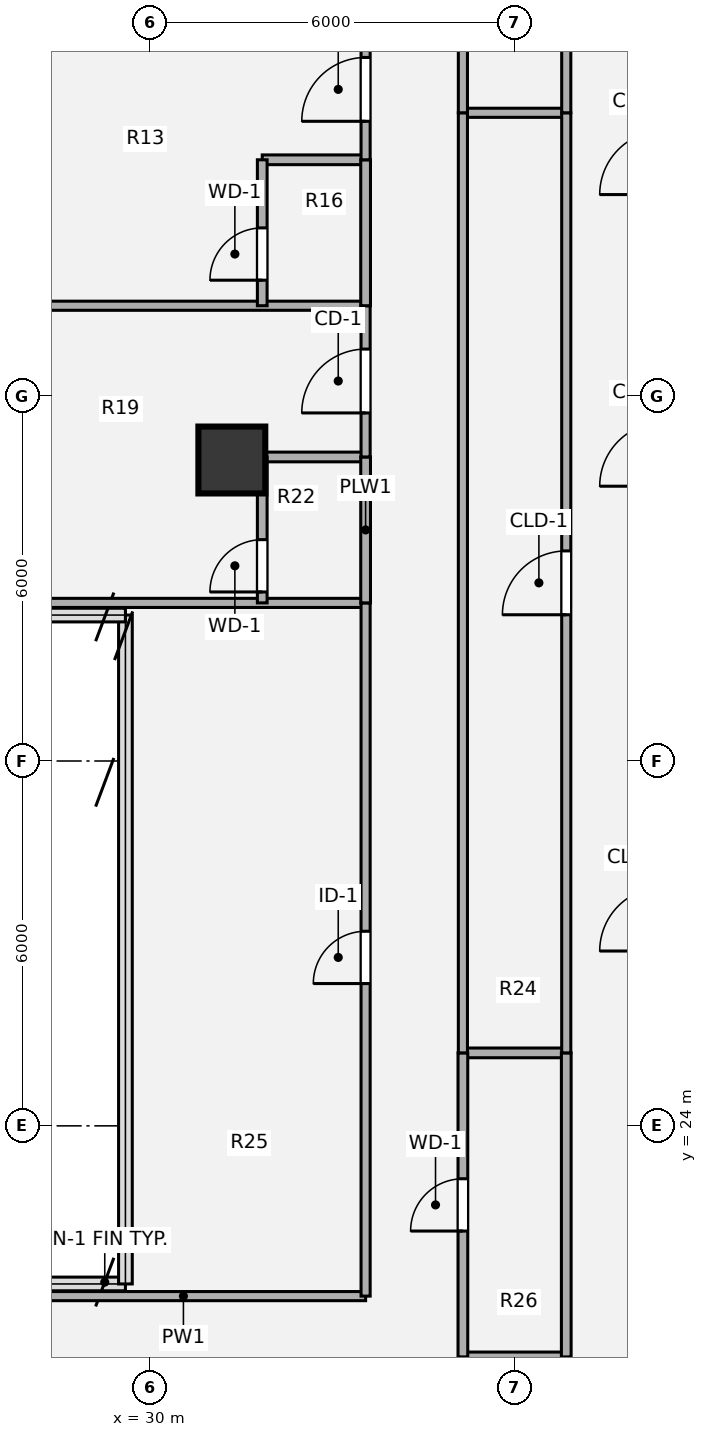
"""IFC4 building model, lengths in metres.
Left out: names, types, materials, properties, quantities, classifications, styles, units other than length and angle.
Written with IfcOpenShell. Run it as: python <this file> out.ifc"""

import sys

from ifc_helpers import new_model, si_unit, direction, frame, frame_2d, origin, origin_2d, place, context, subcontext, project, spatial, rectangle, hollow_circle, extrude, source, transform, mapped, element, fill, save


model = new_model("IFC4")
c1 = context("Model", 3, precision=1e-05, world=origin(), true_north=direction((0.0, 1.0)))
c2 = subcontext(c1, "Body", "Model", "MODEL_VIEW")
j1 = project(units=[si_unit("LENGTHUNIT", "METRE"), si_unit("PLANEANGLEUNIT", "RADIAN")], contexts=[c1])
p1 = place(None, origin())
s1 = spatial("IfcSite", under=j1, at=p1, CompositionType="ELEMENT")
p2 = place(p1, origin())
s2 = spatial("IfcBuilding", under=s1, at=p2, CompositionType="ELEMENT")
p3 = place(p2, frame((0.0, 0.0, 194.22)))
s3 = spatial("IfcBuildingStorey", under=s2, at=p3, CompositionType="ELEMENT", Elevation=194.22)
m1 = source(origin(), c2, "Body", "SweptSolid", [
    extrude(hollow_circle(Radius=0.55, WallThickness=0.04, at=origin_2d()), origin(), (0.0, 0.0, 1.0), 3.78),
])
p4 = place(p3, frame((31.35, 34.95, 0.0), z_axis=(0.0, 0.0, 1.0), x_axis=(1.0, 0.0, 0.0)))
e1 = element("IfcColumn", 1, at=p4, inside=s3, PredefinedType="COLUMN", context=c2, shape_type="MappedRepresentation", body=[
    mapped(m1, transform((0.0, 0.0, 0.0), x_axis=(1.0, 0.0, 0.0), y_axis=(0.0, 1.0, 0.0), z_axis=(0.0, 0.0, 1.0), scale=1.0)),
])
p5 = place(p3, frame((35.15, 20.2, 0.0), z_axis=(0.0, 0.0, 1.0), x_axis=(1.0, 0.0, 0.0)))
e2 = element("IfcWall", 2, at=p5, inside=s3, PredefinedType="PLUMBINGWALL", context=c2, shape_type="SweptSolid", body=[
    extrude(rectangle(XDim=1.7, YDim=0.16, at=frame_2d((0.85, 0.0))), origin(), (0.0, 0.0, 1.0), 3.5),
])
p6 = place(p3, frame((27.558, 21.2, 0.0), z_axis=(0.0, 0.0, 1.0), x_axis=(1.0, 0.0, 0.0)))
e3 = element("IfcWall", 3, at=p6, inside=s3, PredefinedType="PARTITIONING", context=c2, shape_type="SweptSolid", body=[
    extrude(rectangle(XDim=5.992, YDim=0.15, at=frame_2d((2.996, 0.0))), origin(), (0.0, 0.0, 1.0), 3.5),
])
p7 = place(p3, frame((35.15, 25.2, 0.0), z_axis=(0.0, 0.0, 1.0), x_axis=(1.0, 0.0, 0.0)))
e4 = element("IfcWall", 4, at=p7, inside=s3, PredefinedType="PLUMBINGWALL", context=c2, shape_type="SweptSolid", body=[
    extrude(rectangle(XDim=1.7, YDim=0.16, at=frame_2d((0.85, 0.0))), origin(), (0.0, 0.0, 1.0), 3.5),
])
p8 = place(p3, frame((27.557, 32.6, 0.0), z_axis=(0.0, 0.0, 1.0), x_axis=(1.0, 0.0, 0.0)))
e5 = element("IfcWall", 5, at=p8, inside=s3, PredefinedType="PARTITIONING", context=c2, shape_type="SweptSolid", body=[
    extrude(rectangle(XDim=5.993, YDim=0.15, at=frame_2d((2.997, 0.0))), origin(), (0.0, 0.0, 1.0), 3.5),
])
p9 = place(p3, frame((31.85, 35.0, 0.0), z_axis=(0.0, 0.0, 1.0), x_axis=(1.0, 0.0, 0.0)))
e6 = element("IfcWall", 6, at=p9, inside=s3, PredefinedType="PLUMBINGWALL", context=c2, shape_type="SweptSolid", body=[
    extrude(rectangle(XDim=1.7, YDim=0.16, at=frame_2d((0.85, 0.0))), origin(), (0.0, 0.0, 1.0), 2.903),
])
p10 = place(p3, frame((27.35, 37.487, 0.0), z_axis=(0.0, 0.0, 1.0), x_axis=(1.0, 0.0, 0.0)))
e7 = element("IfcWall", 7, at=p10, inside=s3, PredefinedType="PARTITIONING", context=c2, shape_type="SweptSolid", body=[
    extrude(rectangle(XDim=6.2, YDim=0.15, at=frame_2d((3.1, 0.0))), origin(), (0.0, 0.0, 1.0), 3.055),
])
p11 = place(p3, frame((31.85, 39.887, 0.0), z_axis=(0.0, 0.0, 1.0), x_axis=(1.0, 0.0, 0.0)))
e8 = element("IfcWall", 8, at=p11, inside=s3, PredefinedType="PLUMBINGWALL", context=c2, shape_type="SweptSolid", body=[
    extrude(rectangle(XDim=1.7, YDim=0.16, at=frame_2d((0.85, 0.0))), origin(), (0.0, 0.0, 1.0), 3.259),
])
p12 = place(p3, frame((35.15, 40.66, 0.0), z_axis=(0.0, 0.0, 1.0), x_axis=(1.0, 0.0, 0.0)))
e9 = element("IfcWall", 9, at=p12, inside=s3, PredefinedType="PARTITIONING", context=c2, shape_type="SweptSolid", body=[
    extrude(rectangle(XDim=1.7, YDim=0.15, at=frame_2d((0.85, 0.0))), origin(), (0.0, 0.0, 1.0), 3.259),
])
p13 = place(p3, frame((31.85, 32.6, 0.0), z_axis=(0.0, 0.0, 1.0), x_axis=(0.0, 1.0, 0.0)))
e10 = element("IfcWall", 10, at=p13, inside=s3, PredefinedType="PLUMBINGWALL", context=c2, shape_type="SweptSolid", body=[
    extrude(rectangle(XDim=2.4, YDim=0.16, at=frame_2d((1.2, 0.0))), origin(), (0.0, 0.0, 1.0), 3.5),
])
p14 = place(p13, frame((0.18, 0.0, 0.0)))
e11 = element("IfcOpeningElement", 11, at=p14, cuts=e10, PredefinedType="OPENING", context=c2, shape_type="SweptSolid", body=[
    extrude(rectangle(XDim=0.86, YDim=2.1, at=origin_2d()), frame((0.43, 0.09, 1.05), z_axis=(0.0, -1.0, 0.0), x_axis=(1.0, 0.0, 0.0)), (0.0, 0.0, 1.0), 0.18),
])
p15 = place(p3, frame((31.85, 37.487, 0.0), z_axis=(0.0, 0.0, 1.0), x_axis=(0.0, 1.0, 0.0)))
e12 = element("IfcWall", 12, at=p15, inside=s3, PredefinedType="PLUMBINGWALL", context=c2, shape_type="SweptSolid", body=[
    extrude(rectangle(XDim=2.4, YDim=0.16, at=frame_2d((1.2, 0.0))), origin(), (0.0, 0.0, 1.0), 3.5),
])
p16 = place(p15, frame((0.42, 0.0, 0.0)))
e13 = element("IfcOpeningElement", 13, at=p16, cuts=e12, PredefinedType="OPENING", context=c2, shape_type="SweptSolid", body=[
    extrude(rectangle(XDim=0.86, YDim=2.1, at=origin_2d()), frame((0.43, 0.09, 1.05), z_axis=(0.0, -1.0, 0.0), x_axis=(1.0, 0.0, 0.0)), (0.0, 0.0, 1.0), 0.18),
])
p17 = place(p3, frame((33.55, 21.2, 0.0), z_axis=(0.0, 0.0, 1.0), x_axis=(0.0, 1.0, 0.0)))
e14 = element("IfcWall", 14, at=p17, inside=s3, PredefinedType="PARTITIONING", context=c2, shape_type="SweptSolid", body=[
    extrude(rectangle(XDim=11.4, YDim=0.15, at=frame_2d((5.7, 0.0))), origin(), (0.0, 0.0, 1.0), 3.5),
])
p18 = place(p17, frame((5.14, 0.0, 0.0)))
e15 = element("IfcOpeningElement", 15, at=p18, cuts=e14, PredefinedType="OPENING", context=c2, shape_type="SweptSolid", body=[
    extrude(rectangle(XDim=0.86, YDim=2.1, at=origin_2d()), frame((0.43, 0.085, 1.05), z_axis=(0.0, -1.0, 0.0), x_axis=(1.0, 0.0, 0.0)), (0.0, 0.0, 1.0), 0.17),
])
p19 = place(p3, frame((33.55, 32.6, 0.0), z_axis=(0.0, 0.0, 1.0), x_axis=(0.0, 1.0, 0.0)))
e16 = element("IfcWall", 16, at=p19, inside=s3, PredefinedType="PLUMBINGWALL", context=c2, shape_type="SweptSolid", body=[
    extrude(rectangle(XDim=2.4, YDim=0.16, at=frame_2d((1.2, 0.0))), origin(), (0.0, 0.0, 1.0), 3.5),
])
p20 = place(p3, frame((33.55, 35.0, 0.0), z_axis=(0.0, 0.0, 1.0), x_axis=(0.0, 1.0, 0.0)))
e17 = element("IfcWall", 17, at=p20, inside=s3, PredefinedType="PARTITIONING", context=c2, shape_type="SweptSolid", body=[
    extrude(rectangle(XDim=2.487, YDim=0.15, at=frame_2d((1.244, 0.0))), origin(), (0.0, 0.0, 1.0), 3.5),
])
p21 = place(p20, frame((0.724, 0.0, 0.0)))
e18 = element("IfcOpeningElement", 18, at=p21, cuts=e17, PredefinedType="OPENING", context=c2, shape_type="SweptSolid", body=[
    extrude(rectangle(XDim=1.05, YDim=2.1, at=origin_2d()), frame((0.525, 0.085, 1.05), z_axis=(0.0, -1.0, 0.0), x_axis=(1.0, 0.0, 0.0)), (0.0, 0.0, 1.0), 0.17),
])
p22 = place(p3, frame((33.55, 37.487, 0.0), z_axis=(0.0, 0.0, 1.0), x_axis=(0.0, 1.0, 0.0)))
e19 = element("IfcWall", 19, at=p22, inside=s3, PredefinedType="PLUMBINGWALL", context=c2, shape_type="SweptSolid", body=[
    extrude(rectangle(XDim=2.4, YDim=0.16, at=frame_2d((1.2, 0.0))), origin(), (0.0, 0.0, 1.0), 3.5),
])
p23 = place(p3, frame((33.55, 39.887, 0.0), z_axis=(0.0, 0.0, 1.0), x_axis=(0.0, 1.0, 0.0)))
e20 = element("IfcWall", 20, at=p23, inside=s3, PredefinedType="PARTITIONING", context=c2, shape_type="SweptSolid", body=[
    extrude(rectangle(XDim=2.306, YDim=0.15, at=frame_2d((1.153, 0.0))), origin(), (0.0, 0.0, 1.0), 3.5),
])
p24 = place(p23, frame((0.633, 0.0, 0.0)))
e21 = element("IfcOpeningElement", 21, at=p24, cuts=e20, PredefinedType="OPENING", context=c2, shape_type="SweptSolid", body=[
    extrude(rectangle(XDim=1.05, YDim=2.1, at=origin_2d()), frame((0.525, 0.085, 1.05), z_axis=(0.0, -1.0, 0.0), x_axis=(1.0, 0.0, 0.0)), (0.0, 0.0, 1.0), 0.17),
])
p25 = place(p3, frame((35.15, 20.2, 0.0), z_axis=(0.0, 0.0, 1.0), x_axis=(0.0, 1.0, 0.0)))
e22 = element("IfcWall", 22, at=p25, inside=s3, PredefinedType="PLUMBINGWALL", context=c2, shape_type="SweptSolid", body=[
    extrude(rectangle(XDim=5.0, YDim=0.16, at=frame_2d((2.5, 0.0))), origin(), (0.0, 0.0, 1.0), 3.5),
])
p26 = place(p25, frame((2.07, 0.0, 0.0)))
e23 = element("IfcOpeningElement", 23, at=p26, cuts=e22, PredefinedType="OPENING", context=c2, shape_type="SweptSolid", body=[
    extrude(rectangle(XDim=0.86, YDim=2.1, at=origin_2d()), frame((0.43, 0.09, 1.05), z_axis=(0.0, -1.0, 0.0), x_axis=(1.0, 0.0, 0.0)), (0.0, 0.0, 1.0), 0.18),
])
p27 = place(p3, frame((35.15, 25.2, 0.0), z_axis=(0.0, 0.0, 1.0), x_axis=(0.0, 1.0, 0.0)))
e24 = element("IfcWall", 24, at=p27, inside=s3, PredefinedType="PARTITIONING", context=c2, shape_type="SweptSolid", body=[
    extrude(rectangle(XDim=15.46, YDim=0.15, at=frame_2d((7.73, 0.0))), origin(), (0.0, 0.0, 1.0), 3.5),
])
p28 = place(p3, frame((35.15, 40.66, 0.0), z_axis=(0.0, 0.0, 1.0), x_axis=(0.0, 1.0, 0.0)))
e25 = element("IfcWall", 25, at=p28, inside=s3, PredefinedType="PARTITIONING", context=c2, shape_type="SweptSolid", body=[
    extrude(rectangle(XDim=10.54, YDim=0.15, at=frame_2d((5.27, 0.0))), origin(), (0.0, 0.0, 1.0), 3.5),
])
p29 = place(p28, frame((4.81, 0.0, 0.0)))
e26 = element("IfcOpeningElement", 26, at=p29, cuts=e25, PredefinedType="OPENING", context=c2, shape_type="SweptSolid", body=[
    extrude(rectangle(XDim=0.86, YDim=2.1, at=origin_2d()), frame((0.43, 0.085, 1.05), z_axis=(0.0, -1.0, 0.0), x_axis=(1.0, 0.0, 0.0)), (0.0, 0.0, 1.0), 0.17),
])
p30 = place(p3, frame((36.85, 20.2, 0.0), z_axis=(0.0, 0.0, 1.0), x_axis=(0.0, 1.0, 0.0)))
e27 = element("IfcWall", 27, at=p30, inside=s3, PredefinedType="PLUMBINGWALL", context=c2, shape_type="SweptSolid", body=[
    extrude(rectangle(XDim=5.0, YDim=0.16, at=frame_2d((2.5, 0.0))), origin(), (0.0, 0.0, 1.0), 3.5),
])
p31 = place(p3, frame((36.85, 25.2, 0.0), z_axis=(0.0, 0.0, 1.0), x_axis=(0.0, 1.0, 0.0)))
e28 = element("IfcWall", 28, at=p31, inside=s3, PredefinedType="PARTITIONING", context=c2, shape_type="SweptSolid", body=[
    extrude(rectangle(XDim=15.46, YDim=0.15, at=frame_2d((7.73, 0.0))), origin(), (0.0, 0.0, 1.0), 3.5),
])
p32 = place(p31, frame((7.205, 0.0, 0.0)))
e29 = element("IfcOpeningElement", 29, at=p32, cuts=e28, PredefinedType="OPENING", context=c2, shape_type="SweptSolid", body=[
    extrude(rectangle(XDim=1.05, YDim=2.1, at=origin_2d()), frame((0.525, 0.085, 1.05), z_axis=(0.0, -1.0, 0.0), x_axis=(1.0, 0.0, 0.0)), (0.0, 0.0, 1.0), 0.17),
])
p33 = place(p3, frame((36.85, 40.66, 0.0), z_axis=(0.0, 0.0, 1.0), x_axis=(0.0, 1.0, 0.0)))
e30 = element("IfcWall", 30, at=p33, inside=s3, PredefinedType="PARTITIONING", context=c2, shape_type="SweptSolid", body=[
    extrude(rectangle(XDim=10.54, YDim=0.15, at=frame_2d((5.27, 0.0))), origin(), (0.0, 0.0, 1.0), 3.5),
])
m2 = source(origin(), c2, "Body", "SweptSolid", [
    extrude(rectangle(XDim=0.86, YDim=2.1, at=origin_2d()), frame((0.43, 0.025, 1.05), z_axis=(0.0, -1.0, 0.0), x_axis=(1.0, 0.0, 0.0)), (0.0, 0.0, 1.0), 0.05),
])
p34 = place(p14, origin())
e31 = element("IfcDoor", 31, at=p34, inside=s3, OperationType="SINGLE_SWING_LEFT", PredefinedType="DOOR", context=c2, shape_type="MappedRepresentation", body=[
    mapped(m2, transform((0.0, 0.0, 0.0), x_axis=(1.0, 0.0, 0.0), y_axis=(0.0, 1.0, 0.0), z_axis=(0.0, 0.0, 1.0), scale=1.0)),
])
fill(e11, e31)
p35 = place(p16, origin())
e32 = element("IfcDoor", 32, at=p35, inside=s3, OperationType="SINGLE_SWING_LEFT", PredefinedType="DOOR", context=c2, shape_type="MappedRepresentation", body=[
    mapped(m2, transform((0.0, 0.0, 0.0), x_axis=(1.0, 0.0, 0.0), y_axis=(0.0, 1.0, 0.0), z_axis=(0.0, 0.0, 1.0), scale=1.0)),
])
fill(e13, e32)
m3 = source(origin(), c2, "Body", "SweptSolid", [
    extrude(rectangle(XDim=0.86, YDim=2.1, at=origin_2d()), frame((0.43, 0.025, 1.05), z_axis=(0.0, -1.0, 0.0), x_axis=(1.0, 0.0, 0.0)), (0.0, 0.0, 1.0), 0.05),
])
p36 = place(p18, origin())
e33 = element("IfcDoor", 33, at=p36, inside=s3, OperationType="SINGLE_SWING_LEFT", PredefinedType="DOOR", context=c2, shape_type="MappedRepresentation", body=[
    mapped(m3, transform((0.0, 0.0, 0.0), x_axis=(1.0, 0.0, 0.0), y_axis=(0.0, 1.0, 0.0), z_axis=(0.0, 0.0, 1.0), scale=1.0)),
])
fill(e15, e33)
m4 = source(origin(), c2, "Body", "SweptSolid", [
    extrude(rectangle(XDim=1.05, YDim=2.1, at=origin_2d()), frame((0.525, 0.025, 1.05), z_axis=(0.0, -1.0, 0.0), x_axis=(1.0, 0.0, 0.0)), (0.0, 0.0, 1.0), 0.05),
])
p37 = place(p21, origin())
e34 = element("IfcDoor", 34, at=p37, inside=s3, OperationType="SINGLE_SWING_LEFT", PredefinedType="DOOR", context=c2, shape_type="MappedRepresentation", body=[
    mapped(m4, transform((0.0, 0.0, 0.0), x_axis=(1.0, 0.0, 0.0), y_axis=(0.0, 1.0, 0.0), z_axis=(0.0, 0.0, 1.0), scale=1.0)),
])
fill(e18, e34)
p38 = place(p24, origin())
e35 = element("IfcDoor", 35, at=p38, inside=s3, OperationType="SINGLE_SWING_LEFT", PredefinedType="DOOR", context=c2, shape_type="MappedRepresentation", body=[
    mapped(m4, transform((0.0, 0.0, 0.0), x_axis=(1.0, 0.0, 0.0), y_axis=(0.0, 1.0, 0.0), z_axis=(0.0, 0.0, 1.0), scale=1.0)),
])
fill(e21, e35)
p39 = place(p26, origin())
e36 = element("IfcDoor", 36, at=p39, inside=s3, OperationType="SINGLE_SWING_LEFT", PredefinedType="DOOR", context=c2, shape_type="MappedRepresentation", body=[
    mapped(m2, transform((0.0, 0.0, 0.0), x_axis=(1.0, 0.0, 0.0), y_axis=(0.0, 1.0, 0.0), z_axis=(0.0, 0.0, 1.0), scale=1.0)),
])
fill(e23, e36)
m5 = source(origin(), c2, "Body", "SweptSolid", [
    extrude(rectangle(XDim=1.05, YDim=2.1, at=origin_2d()), frame((0.525, 0.025, 1.05), z_axis=(0.0, -1.0, 0.0), x_axis=(1.0, 0.0, 0.0)), (0.0, 0.0, 1.0), 0.05),
])
p40 = place(p32, origin())
e37 = element("IfcDoor", 37, at=p40, inside=s3, OperationType="SINGLE_SWING_LEFT", PredefinedType="DOOR", context=c2, shape_type="MappedRepresentation", body=[
    mapped(m5, transform((0.0, 0.0, 0.0), x_axis=(1.0, 0.0, 0.0), y_axis=(0.0, 1.0, 0.0), z_axis=(0.0, 0.0, 1.0), scale=1.0)),
])
fill(e29, e37)
save(model, sys.argv[1])
